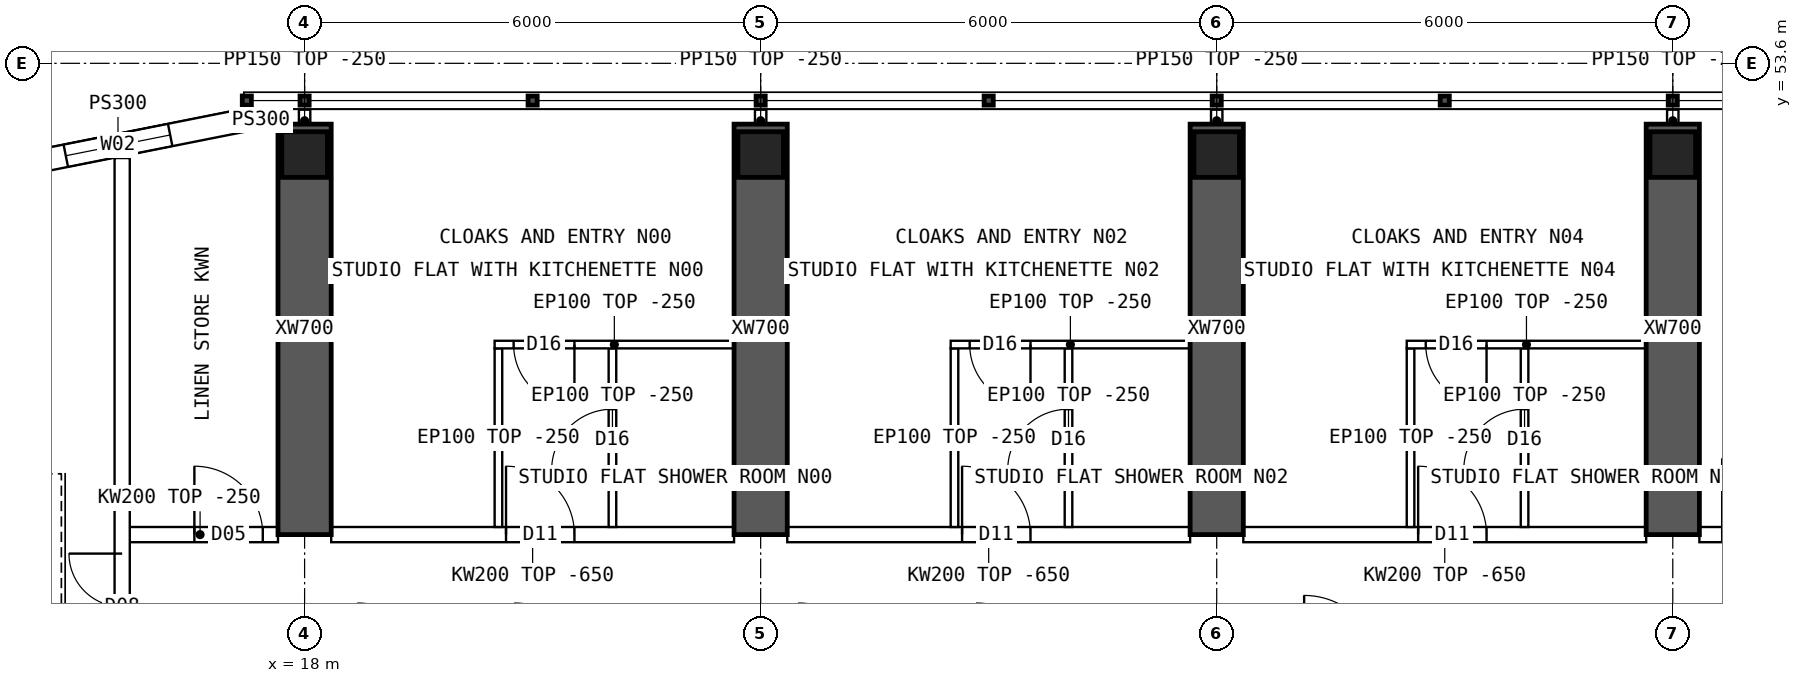
"""IFC4 building model, lengths in metres.
Left out: names, types, materials, properties, quantities, classifications, styles, units other than length and angle.
Written with IfcOpenShell. Run it as: python <this file> out.ifc"""

import sys

from ifc_helpers import new_model, si_unit, direction, frame, frame_2d, origin, origin_2d, place, context, subcontext, project, spatial, polyline, rectangle, hollow_rectangle, outline, extrude, element, fill, save


model = new_model("IFC4")
c1 = context("Model", 3, precision=1e-05, world=origin(), true_north=direction((0.0, 1.0)))
c2 = subcontext(c1, "Body", "Model", "MODEL_VIEW")
j1 = project(units=[si_unit("LENGTHUNIT", "METRE"), si_unit("PLANEANGLEUNIT", "RADIAN")], contexts=[c1])
p1 = place(None, origin())
s1 = spatial("IfcSite", under=j1, at=p1, CompositionType="ELEMENT")
p2 = place(p1, origin())
s2 = spatial("IfcBuilding", under=s1, at=p2, CompositionType="ELEMENT")
p3 = place(p2, frame((0.0, 0.0, 250.3)))
s3 = spatial("IfcBuildingStorey", under=s2, at=p3, CompositionType="ELEMENT", Elevation=250.3)
for number, where, z_axis, x_axis in (
    (1, (18.0, 52.4, 0.0), (0.0, 0.0, 1.0), (1.0, 0.0, 0.0)),
    (2, (24.0, 52.4, 0.0), (0.0, 0.0, 1.0), (1.0, 0.0, 0.0)),
    (3, (30.0, 52.4, 0.0), (0.0, 0.0, 1.0), (1.0, 0.0, 0.0)),
    (4, (36.0, 52.4, 0.0), (0.0, 0.0, 1.0), (1.0, 0.0, 0.0)),
):
    element("IfcColumn", number, at=place(p3, frame(where, z_axis=z_axis, x_axis=x_axis)), inside=s3, PredefinedType="COLUMN", context=c2, shape_type="SweptSolid", body=[
        extrude(hollow_rectangle(XDim=0.6, YDim=0.6, WallThickness=0.06, at=origin_2d()), origin(), (0.0, 0.0, 1.0), 3.75),
    ])
for number, where, z_axis, x_axis in (
    (5, (18.0, 47.4, 0.0), (0.0, 0.0, 1.0), (0.0, 1.0, 0.0)),
    (6, (24.0, 47.4, 0.0), (0.0, 0.0, 1.0), (0.0, 1.0, 0.0)),
    (7, (30.0, 47.4, 0.0), (0.0, 0.0, 1.0), (0.0, 1.0, 0.0)),
    (8, (36.0, 47.4, 0.0), (0.0, 0.0, 1.0), (0.0, 1.0, 0.0)),
):
    element("IfcWall", number, at=place(p3, frame(where, z_axis=z_axis, x_axis=x_axis)), inside=s3, PredefinedType="SHEAR", context=c2, shape_type="SweptSolid", body=[
        extrude(rectangle(XDim=5.4, YDim=0.7, at=frame_2d((2.7, 0.0))), origin(), (0.0, 0.0, 1.0), 3.75),
    ])
p4 = place(p3, frame((17.2, 52.85, 0.0), z_axis=(0.0, 0.0, 1.0), x_axis=(-0.98078325777, -0.195100490205, 0.0)))
e9 = element("IfcWall", 9, at=p4, inside=s3, PredefinedType="SOLIDWALL", context=c2, shape_type="SweptSolid", body=[
    extrude(outline(polyline([(-0.03, -0.15), (3.405, -0.15), (3.345, 0.15), (0.03, 0.15), (-0.03, -0.15)])), origin(), (0.0, 0.0, 1.0), 3.5),
])
p5 = place(p4, frame((0.988, 0.0, 0.9)))
e10 = element("IfcOpeningElement", 10, at=p5, cuts=e9, PredefinedType="OPENING", context=c2, shape_type="SweptSolid", body=[
    extrude(rectangle(XDim=1.4, YDim=1.8, at=frame_2d((0.7, 0.9))), frame((0.0, 0.16, 0.0), z_axis=(0.0, -1.0, 0.0), x_axis=(1.0, 0.0, 0.0)), (0.0, 0.0, 1.0), 0.32),
])
p6 = place(p3, frame((17.2, 52.85, 0.0), z_axis=(0.0, 0.0, 1.0), x_axis=(1.0, 0.0, 0.0)))
e11 = element("IfcWall", 11, at=p6, inside=s3, PredefinedType="SOLIDWALL", context=c2, shape_type="SweptSolid", body=[
    extrude(rectangle(XDim=0.45, YDim=0.3, at=frame_2d((0.225, 0.0))), origin(), (0.0, 0.0, 1.0), 3.5),
])
p7 = place(p3, frame((15.6, 47.4, 0.0), z_axis=(0.0, 0.0, 1.0), x_axis=(1.0, 0.0, 0.0)))
e12 = element("IfcWall", 12, at=p7, inside=s3, PredefinedType="SOLIDWALL", context=c2, shape_type="SweptSolid", body=[
    extrude(rectangle(XDim=2.05, YDim=0.2, at=frame_2d((1.025, 0.0))), origin(), (0.0, 0.0, 1.0), 3.5),
])
p8 = place(p7, frame((0.95, 0.0, 0.0)))
e13 = element("IfcOpeningElement", 13, at=p8, cuts=e12, PredefinedType="OPENING", context=c2, shape_type="SweptSolid", body=[
    extrude(rectangle(XDim=0.9, YDim=2.1, at=frame_2d((0.45, 1.05))), frame((0.0, 0.11, 0.0), z_axis=(0.0, -1.0, 0.0), x_axis=(1.0, 0.0, 0.0)), (0.0, 0.0, 1.0), 0.22),
])
p9 = place(p3, frame((18.35, 47.4, 0.0), z_axis=(0.0, 0.0, 1.0), x_axis=(1.0, 0.0, 0.0)))
e14 = element("IfcWall", 14, at=p9, inside=s3, PredefinedType="SOLIDWALL", context=c2, shape_type="SweptSolid", body=[
    extrude(outline(polyline([(0.0, 0.0), (5.3, 0.0), (5.3, 3.1), (0.0, 3.1), (0.0, 0.0)])), frame((0.0, 0.1, 0.0), z_axis=(0.0, -1.0, 0.0), x_axis=(1.0, 0.0, 0.0)), (0.0, 0.0, 1.0), 0.2),
])
p10 = place(p9, frame((2.3, 0.0, 0.0)))
e15 = element("IfcOpeningElement", 15, at=p10, cuts=e14, PredefinedType="OPENING", context=c2, shape_type="SweptSolid", body=[
    extrude(rectangle(XDim=0.9, YDim=2.1, at=frame_2d((0.45, 1.05))), frame((0.0, 0.11, 0.0), z_axis=(0.0, -1.0, 0.0), x_axis=(1.0, 0.0, 0.0)), (0.0, 0.0, 1.0), 0.22),
])
p11 = place(p3, frame((24.35, 47.4, 0.0), z_axis=(0.0, 0.0, 1.0), x_axis=(1.0, 0.0, 0.0)))
e16 = element("IfcWall", 16, at=p11, inside=s3, PredefinedType="SOLIDWALL", context=c2, shape_type="SweptSolid", body=[
    extrude(outline(polyline([(0.0, 0.0), (5.3, 0.0), (5.3, 3.1), (0.0, 3.1), (0.0, 0.0)])), frame((0.0, 0.1, 0.0), z_axis=(0.0, -1.0, 0.0), x_axis=(1.0, 0.0, 0.0)), (0.0, 0.0, 1.0), 0.2),
])
p12 = place(p11, frame((2.3, 0.0, 0.0)))
e17 = element("IfcOpeningElement", 17, at=p12, cuts=e16, PredefinedType="OPENING", context=c2, shape_type="SweptSolid", body=[
    extrude(rectangle(XDim=0.9, YDim=2.1, at=frame_2d((0.45, 1.05))), frame((0.0, 0.11, 0.0), z_axis=(0.0, -1.0, 0.0), x_axis=(1.0, 0.0, 0.0)), (0.0, 0.0, 1.0), 0.22),
])
p13 = place(p3, frame((30.35, 47.4, 0.0), z_axis=(0.0, 0.0, 1.0), x_axis=(1.0, 0.0, 0.0)))
e18 = element("IfcWall", 18, at=p13, inside=s3, PredefinedType="SOLIDWALL", context=c2, shape_type="SweptSolid", body=[
    extrude(outline(polyline([(0.0, 0.0), (5.3, 0.0), (5.3, 3.1), (0.0, 3.1), (0.0, 0.0)])), frame((0.0, 0.1, 0.0), z_axis=(0.0, -1.0, 0.0), x_axis=(1.0, 0.0, 0.0)), (0.0, 0.0, 1.0), 0.2),
])
p14 = place(p13, frame((2.3, 0.0, 0.0)))
e19 = element("IfcOpeningElement", 19, at=p14, cuts=e18, PredefinedType="OPENING", context=c2, shape_type="SweptSolid", body=[
    extrude(rectangle(XDim=0.9, YDim=2.1, at=frame_2d((0.45, 1.05))), frame((0.0, 0.11, 0.0), z_axis=(0.0, -1.0, 0.0), x_axis=(1.0, 0.0, 0.0)), (0.0, 0.0, 1.0), 0.22),
])
p15 = place(p3, frame((36.35, 47.4, 0.0), z_axis=(0.0, 0.0, 1.0), x_axis=(1.0, 0.0, 0.0)))
e20 = element("IfcWall", 20, at=p15, inside=s3, PredefinedType="SOLIDWALL", context=c2, shape_type="SweptSolid", body=[
    extrude(outline(polyline([(0.0, 0.0), (5.3, 0.0), (5.3, 3.1), (0.0, 3.1), (0.0, 0.0)])), frame((0.0, 0.1, 0.0), z_axis=(0.0, -1.0, 0.0), x_axis=(1.0, 0.0, 0.0)), (0.0, 0.0, 1.0), 0.2),
])
p16 = place(p15, frame((0.3, 0.0, 0.0)))
e21 = element("IfcOpeningElement", 21, at=p16, cuts=e20, PredefinedType="OPENING", context=c2, shape_type="SweptSolid", body=[
    extrude(rectangle(XDim=1.0, YDim=2.1, at=frame_2d((0.5, 1.05))), frame((0.0, 0.11, 0.0), z_axis=(0.0, -1.0, 0.0), x_axis=(1.0, 0.0, 0.0)), (0.0, 0.0, 1.0), 0.22),
])
p17 = place(p3, frame((20.5, 49.9, 0.0), z_axis=(0.0, 0.0, 1.0), x_axis=(1.0, 0.0, 0.0)))
e22 = element("IfcWall", 22, at=p17, inside=s3, PredefinedType="PARTITIONING", context=c2, shape_type="SweptSolid", body=[
    extrude(rectangle(XDim=3.15, YDim=0.1, at=frame_2d((1.575, 0.0))), origin(), (0.0, 0.0, 1.0), 3.5),
])
p18 = place(p17, frame((0.25, 0.0, 0.0)))
e23 = element("IfcOpeningElement", 23, at=p18, cuts=e22, PredefinedType="OPENING", context=c2, shape_type="SweptSolid", body=[
    extrude(rectangle(XDim=0.8, YDim=2.1, at=frame_2d((0.4, 1.05))), frame((0.0, 0.06, 0.0), z_axis=(0.0, -1.0, 0.0), x_axis=(1.0, 0.0, 0.0)), (0.0, 0.0, 1.0), 0.12),
])
p19 = place(p3, frame((20.55, 49.85, 0.0), z_axis=(0.0, 0.0, 1.0), x_axis=(0.0, -1.0, 0.0)))
e24 = element("IfcWall", 24, at=p19, inside=s3, PredefinedType="PARTITIONING", context=c2, shape_type="SweptSolid", body=[
    extrude(outline(polyline([(0.0, 0.0), (2.35, 0.0), (2.35, 3.1), (2.302, 3.1), (2.3, 3.5), (0.0, 3.5), (0.0, 0.0)])), frame((0.0, 0.05, 0.0), z_axis=(0.0, -1.0, 0.0), x_axis=(1.0, 0.0, 0.0)), (0.0, 0.0, 1.0), 0.1),
])
p20 = place(p3, frame((22.05, 49.85, 0.0), z_axis=(0.0, 0.0, 1.0), x_axis=(0.0, -1.0, 0.0)))
e25 = element("IfcWall", 25, at=p20, inside=s3, PredefinedType="PARTITIONING", context=c2, shape_type="SweptSolid", body=[
    extrude(outline(polyline([(0.0, 0.0), (2.35, 0.0), (2.35, 3.1), (2.302, 3.1), (2.3, 3.5), (0.0, 3.5), (0.0, 0.0)])), frame((0.0, 0.05, 0.0), z_axis=(0.0, -1.0, 0.0), x_axis=(1.0, 0.0, 0.0)), (0.0, 0.0, 1.0), 0.1),
])
p21 = place(p20, frame((0.8, 0.0, 0.0)))
e26 = element("IfcOpeningElement", 26, at=p21, cuts=e25, PredefinedType="OPENING", context=c2, shape_type="SweptSolid", body=[
    extrude(rectangle(XDim=0.8, YDim=2.1, at=frame_2d((0.4, 1.05))), frame((0.0, 0.06, 0.0), z_axis=(0.0, -1.0, 0.0), x_axis=(1.0, 0.0, 0.0)), (0.0, 0.0, 1.0), 0.12),
])
p22 = place(p3, frame((26.5, 49.9, 0.0), z_axis=(0.0, 0.0, 1.0), x_axis=(1.0, 0.0, 0.0)))
e27 = element("IfcWall", 27, at=p22, inside=s3, PredefinedType="PARTITIONING", context=c2, shape_type="SweptSolid", body=[
    extrude(rectangle(XDim=3.15, YDim=0.1, at=frame_2d((1.575, 0.0))), origin(), (0.0, 0.0, 1.0), 3.5),
])
p23 = place(p22, frame((0.25, 0.0, 0.0)))
e28 = element("IfcOpeningElement", 28, at=p23, cuts=e27, PredefinedType="OPENING", context=c2, shape_type="SweptSolid", body=[
    extrude(rectangle(XDim=0.8, YDim=2.1, at=frame_2d((0.4, 1.05))), frame((0.0, 0.06, 0.0), z_axis=(0.0, -1.0, 0.0), x_axis=(1.0, 0.0, 0.0)), (0.0, 0.0, 1.0), 0.12),
])
p24 = place(p3, frame((26.55, 49.85, 0.0), z_axis=(0.0, 0.0, 1.0), x_axis=(0.0, -1.0, 0.0)))
e29 = element("IfcWall", 29, at=p24, inside=s3, PredefinedType="PARTITIONING", context=c2, shape_type="SweptSolid", body=[
    extrude(outline(polyline([(0.0, 0.0), (2.35, 0.0), (2.35, 3.1), (2.302, 3.1), (2.3, 3.5), (0.0, 3.5), (0.0, 0.0)])), frame((0.0, 0.05, 0.0), z_axis=(0.0, -1.0, 0.0), x_axis=(1.0, 0.0, 0.0)), (0.0, 0.0, 1.0), 0.1),
])
p25 = place(p3, frame((28.05, 49.85, 0.0), z_axis=(0.0, 0.0, 1.0), x_axis=(0.0, -1.0, 0.0)))
e30 = element("IfcWall", 30, at=p25, inside=s3, PredefinedType="PARTITIONING", context=c2, shape_type="SweptSolid", body=[
    extrude(outline(polyline([(0.0, 0.0), (2.35, 0.0), (2.35, 3.1), (2.302, 3.1), (2.3, 3.5), (0.0, 3.5), (0.0, 0.0)])), frame((0.0, 0.05, 0.0), z_axis=(0.0, -1.0, 0.0), x_axis=(1.0, 0.0, 0.0)), (0.0, 0.0, 1.0), 0.1),
])
p26 = place(p25, frame((0.8, 0.0, 0.0)))
e31 = element("IfcOpeningElement", 31, at=p26, cuts=e30, PredefinedType="OPENING", context=c2, shape_type="SweptSolid", body=[
    extrude(rectangle(XDim=0.8, YDim=2.1, at=frame_2d((0.4, 1.05))), frame((0.0, 0.06, 0.0), z_axis=(0.0, -1.0, 0.0), x_axis=(1.0, 0.0, 0.0)), (0.0, 0.0, 1.0), 0.12),
])
p27 = place(p3, frame((32.5, 49.9, 0.0), z_axis=(0.0, 0.0, 1.0), x_axis=(1.0, 0.0, 0.0)))
e32 = element("IfcWall", 32, at=p27, inside=s3, PredefinedType="PARTITIONING", context=c2, shape_type="SweptSolid", body=[
    extrude(rectangle(XDim=3.15, YDim=0.1, at=frame_2d((1.575, 0.0))), origin(), (0.0, 0.0, 1.0), 3.5),
])
p28 = place(p27, frame((0.25, 0.0, 0.0)))
e33 = element("IfcOpeningElement", 33, at=p28, cuts=e32, PredefinedType="OPENING", context=c2, shape_type="SweptSolid", body=[
    extrude(rectangle(XDim=0.8, YDim=2.1, at=frame_2d((0.4, 1.05))), frame((0.0, 0.06, 0.0), z_axis=(0.0, -1.0, 0.0), x_axis=(1.0, 0.0, 0.0)), (0.0, 0.0, 1.0), 0.12),
])
p29 = place(p3, frame((32.55, 49.85, 0.0), z_axis=(0.0, 0.0, 1.0), x_axis=(0.0, -1.0, 0.0)))
e34 = element("IfcWall", 34, at=p29, inside=s3, PredefinedType="PARTITIONING", context=c2, shape_type="SweptSolid", body=[
    extrude(outline(polyline([(0.0, 0.0), (2.35, 0.0), (2.35, 3.1), (2.302, 3.1), (2.3, 3.5), (0.0, 3.5), (0.0, 0.0)])), frame((0.0, 0.05, 0.0), z_axis=(0.0, -1.0, 0.0), x_axis=(1.0, 0.0, 0.0)), (0.0, 0.0, 1.0), 0.1),
])
p30 = place(p3, frame((34.05, 49.85, 0.0), z_axis=(0.0, 0.0, 1.0), x_axis=(0.0, -1.0, 0.0)))
e35 = element("IfcWall", 35, at=p30, inside=s3, PredefinedType="PARTITIONING", context=c2, shape_type="SweptSolid", body=[
    extrude(outline(polyline([(0.0, 0.0), (2.35, 0.0), (2.35, 3.1), (2.302, 3.1), (2.3, 3.5), (0.0, 3.5), (0.0, 0.0)])), frame((0.0, 0.05, 0.0), z_axis=(0.0, -1.0, 0.0), x_axis=(1.0, 0.0, 0.0)), (0.0, 0.0, 1.0), 0.1),
])
p31 = place(p30, frame((0.8, 0.0, 0.0)))
e36 = element("IfcOpeningElement", 36, at=p31, cuts=e35, PredefinedType="OPENING", context=c2, shape_type="SweptSolid", body=[
    extrude(rectangle(XDim=0.8, YDim=2.1, at=frame_2d((0.4, 1.05))), frame((0.0, 0.06, 0.0), z_axis=(0.0, -1.0, 0.0), x_axis=(1.0, 0.0, 0.0)), (0.0, 0.0, 1.0), 0.12),
])
p32 = place(p3, frame((15.6, 11.646, 0.0), z_axis=(0.0, 0.0, 1.0), x_axis=(0.0, 1.0, 0.0)))
e37 = element("IfcWall", 37, at=p32, inside=s3, PredefinedType="SOLIDWALL", context=c2, shape_type="SweptSolid", body=[
    extrude(rectangle(XDim=40.708, YDim=0.2, at=frame_2d((20.354, 0.0))), origin(), (0.0, 0.0, 1.0), 3.5),
])
p33 = place(p32, frame((5.104, 0.0, 0.0)))
e38 = element("IfcOpeningElement", 38, at=p33, cuts=e37, PredefinedType="OPENING", context=c2, shape_type="SweptSolid", body=[
    extrude(rectangle(XDim=1.4, YDim=2.1, at=frame_2d((0.7, 1.05))), frame((0.0, 0.11, 0.0), z_axis=(0.0, -1.0, 0.0), x_axis=(1.0, 0.0, 0.0)), (0.0, 0.0, 1.0), 0.22),
])
p34 = place(p32, frame((34.104, 0.0, 0.0)))
e39 = element("IfcOpeningElement", 39, at=p34, cuts=e37, PredefinedType="OPENING", context=c2, shape_type="SweptSolid", body=[
    extrude(rectangle(XDim=1.4, YDim=2.1, at=frame_2d((0.7, 1.05))), frame((0.0, 0.11, 0.0), z_axis=(0.0, -1.0, 0.0), x_axis=(1.0, 0.0, 0.0)), (0.0, 0.0, 1.0), 0.22),
])
for number, where, z_axis, x_axis in (
    (40, (18.0, 52.7, 0.0), (0.0, 0.0, 1.0), (0.0, 1.0, 0.0)),
    (41, (24.0, 52.7, 0.0), (0.0, 0.0, 1.0), (0.0, 1.0, 0.0)),
    (42, (30.0, 52.7, 0.0), (0.0, 0.0, 1.0), (0.0, 1.0, 0.0)),
    (43, (36.0, 52.7, 0.0), (0.0, 0.0, 1.0), (0.0, 1.0, 0.0)),
):
    element("IfcWall", number, at=place(p3, frame(where, z_axis=z_axis, x_axis=x_axis)), inside=s3, PredefinedType="PARTITIONING", context=c2, shape_type="SweptSolid", body=[
        extrude(rectangle(XDim=0.29, YDim=0.15, at=frame_2d((0.145, 0.0))), origin(), (0.0, 0.0, 1.0), 3.5),
    ])
p35 = place(p5, origin())
e44 = element("IfcWindow", 44, at=p35, inside=s3, PartitioningType="SINGLE_PANEL", PredefinedType="WINDOW", context=c2, shape_type="SweptSolid", body=[
    extrude(rectangle(XDim=1.4, YDim=1.8, at=frame_2d((0.7, 0.9))), frame((0.0, 0.03, 0.0), z_axis=(0.0, -1.0, 0.0), x_axis=(1.0, 0.0, 0.0)), (0.0, 0.0, 1.0), 0.06),
])
fill(e10, e44)
p36 = place(p18, origin())
e45 = element("IfcDoor", 45, at=p36, inside=s3, OperationType="SINGLE_SWING_RIGHT", PredefinedType="DOOR", context=c2, shape_type="SweptSolid", body=[
    extrude(rectangle(XDim=0.8, YDim=2.1, at=frame_2d((0.4, 1.05))), frame((0.0, 0.025, 0.0), z_axis=(0.0, -1.0, 0.0), x_axis=(1.0, 0.0, 0.0)), (0.0, 0.0, 1.0), 0.05),
])
fill(e23, e45)
p37 = place(p21, origin())
e46 = element("IfcDoor", 46, at=p37, inside=s3, OperationType="SINGLE_SWING_RIGHT", PredefinedType="DOOR", context=c2, shape_type="SweptSolid", body=[
    extrude(rectangle(XDim=0.8, YDim=2.1, at=frame_2d((0.4, 1.05))), frame((0.0, 0.025, 0.0), z_axis=(0.0, -1.0, 0.0), x_axis=(1.0, 0.0, 0.0)), (0.0, 0.0, 1.0), 0.05),
])
fill(e26, e46)
p38 = place(p10, origin())
e47 = element("IfcDoor", 47, at=p38, inside=s3, OperationType="SINGLE_SWING_LEFT", PredefinedType="DOOR", context=c2, shape_type="SweptSolid", body=[
    extrude(rectangle(XDim=0.9, YDim=2.1, at=frame_2d((0.45, 1.05))), frame((0.0, 0.025, 0.0), z_axis=(0.0, -1.0, 0.0), x_axis=(1.0, 0.0, 0.0)), (0.0, 0.0, 1.0), 0.05),
])
fill(e15, e47)
p39 = place(p23, origin())
e48 = element("IfcDoor", 48, at=p39, inside=s3, OperationType="SINGLE_SWING_RIGHT", PredefinedType="DOOR", context=c2, shape_type="SweptSolid", body=[
    extrude(rectangle(XDim=0.8, YDim=2.1, at=frame_2d((0.4, 1.05))), frame((0.0, 0.025, 0.0), z_axis=(0.0, -1.0, 0.0), x_axis=(1.0, 0.0, 0.0)), (0.0, 0.0, 1.0), 0.05),
])
fill(e28, e48)
p40 = place(p26, origin())
e49 = element("IfcDoor", 49, at=p40, inside=s3, OperationType="SINGLE_SWING_RIGHT", PredefinedType="DOOR", context=c2, shape_type="SweptSolid", body=[
    extrude(rectangle(XDim=0.8, YDim=2.1, at=frame_2d((0.4, 1.05))), frame((0.0, 0.025, 0.0), z_axis=(0.0, -1.0, 0.0), x_axis=(1.0, 0.0, 0.0)), (0.0, 0.0, 1.0), 0.05),
])
fill(e31, e49)
p41 = place(p12, origin())
e50 = element("IfcDoor", 50, at=p41, inside=s3, OperationType="SINGLE_SWING_LEFT", PredefinedType="DOOR", context=c2, shape_type="SweptSolid", body=[
    extrude(rectangle(XDim=0.9, YDim=2.1, at=frame_2d((0.45, 1.05))), frame((0.0, 0.025, 0.0), z_axis=(0.0, -1.0, 0.0), x_axis=(1.0, 0.0, 0.0)), (0.0, 0.0, 1.0), 0.05),
])
fill(e17, e50)
p42 = place(p28, origin())
e51 = element("IfcDoor", 51, at=p42, inside=s3, OperationType="SINGLE_SWING_RIGHT", PredefinedType="DOOR", context=c2, shape_type="SweptSolid", body=[
    extrude(rectangle(XDim=0.8, YDim=2.1, at=frame_2d((0.4, 1.05))), frame((0.0, 0.025, 0.0), z_axis=(0.0, -1.0, 0.0), x_axis=(1.0, 0.0, 0.0)), (0.0, 0.0, 1.0), 0.05),
])
fill(e33, e51)
p43 = place(p31, origin())
e52 = element("IfcDoor", 52, at=p43, inside=s3, OperationType="SINGLE_SWING_RIGHT", PredefinedType="DOOR", context=c2, shape_type="SweptSolid", body=[
    extrude(rectangle(XDim=0.8, YDim=2.1, at=frame_2d((0.4, 1.05))), frame((0.0, 0.025, 0.0), z_axis=(0.0, -1.0, 0.0), x_axis=(1.0, 0.0, 0.0)), (0.0, 0.0, 1.0), 0.05),
])
fill(e36, e52)
p44 = place(p14, origin())
e53 = element("IfcDoor", 53, at=p44, inside=s3, OperationType="SINGLE_SWING_LEFT", PredefinedType="DOOR", context=c2, shape_type="SweptSolid", body=[
    extrude(rectangle(XDim=0.9, YDim=2.1, at=frame_2d((0.45, 1.05))), frame((0.0, 0.025, 0.0), z_axis=(0.0, -1.0, 0.0), x_axis=(1.0, 0.0, 0.0)), (0.0, 0.0, 1.0), 0.05),
])
fill(e19, e53)
p45 = place(p34, origin())
e54 = element("IfcDoor", 54, at=p45, inside=s3, OperationType="DOUBLE_DOOR_SINGLE_SWING", PredefinedType="DOOR", context=c2, shape_type="SweptSolid", body=[
    extrude(rectangle(XDim=1.4, YDim=2.1, at=frame_2d((0.7, 1.05))), frame((0.0, 0.025, 0.0), z_axis=(0.0, -1.0, 0.0), x_axis=(1.0, 0.0, 0.0)), (0.0, 0.0, 1.0), 0.05),
])
fill(e39, e54)
p46 = place(p8, origin())
e55 = element("IfcDoor", 55, at=p46, inside=s3, OperationType="SINGLE_SWING_LEFT", PredefinedType="DOOR", context=c2, shape_type="SweptSolid", body=[
    extrude(rectangle(XDim=0.9, YDim=2.1, at=frame_2d((0.45, 1.05))), frame((0.0, 0.025, 0.0), z_axis=(0.0, -1.0, 0.0), x_axis=(1.0, 0.0, 0.0)), (0.0, 0.0, 1.0), 0.05),
])
fill(e13, e55)
save(model, sys.argv[1])
